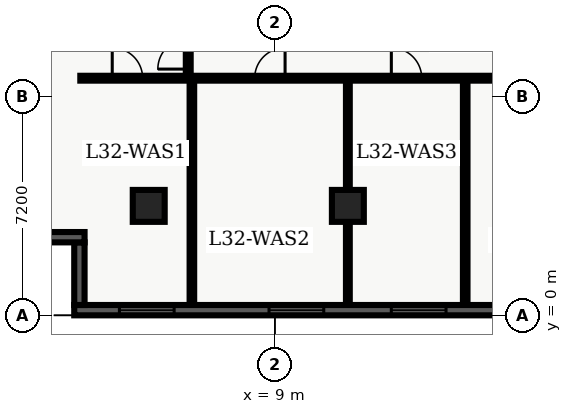
"""IFC4 building model, lengths in metres.
Left out: names, types, materials, properties, quantities, classifications, styles, units other than length and angle.
Written with IfcOpenShell. Run it as: python <this file> out.ifc"""

import sys

from ifc_helpers import new_model, entity, si_unit, converted_unit, direction, frame, origin_with_axes, origin_2d_with_axis, place, context, subcontext, project, spatial, polyline, rectangle, outline, extrude, element, fill, save


model = new_model("IFC4")
c1 = context("Model", 3, precision=1e-05, world=origin_with_axes(), true_north=direction((0.0, 1.0)))
c2 = subcontext(c1, "Body", "Model", "MODEL_VIEW")
j1 = project(units=[si_unit("LENGTHUNIT", "METRE"), converted_unit("PLANEANGLEUNIT", "DEGREE", entity("IfcPlaneAngleMeasure", 0.017), si_unit("PLANEANGLEUNIT", "RADIAN"), dimensions=[0, 0, 0, 0, 0, 0, 0])], contexts=[c1])
p1 = place(None, origin_with_axes())
s1 = spatial("IfcSite", under=j1, at=p1, CompositionType="ELEMENT")
p2 = place(p1, origin_with_axes())
s2 = spatial("IfcBuilding", under=s1, at=p2, CompositionType="ELEMENT")
p3 = place(p2, frame((0.0, 0.0, 132.9), z_axis=(0.0, 0.0, 1.0), x_axis=(1.0, 0.0, 0.0)))
s3 = spatial("IfcBuildingStorey", under=s2, at=p3, CompositionType="ELEMENT", Elevation=132.9)
for number, where, z_axis, x_axis in (
    (1, (11.4, 3.6, 0.0), (0.0, 0.0, 1.0), (1.0, 0.0, 0.0)),
    (2, (4.85, 3.6, 0.0), (0.0, 0.0, 1.0), (1.0, 0.0, 0.0)),
):
    element("IfcColumn", number, at=place(p3, frame(where, z_axis=z_axis, x_axis=x_axis)), inside=s3, PredefinedType="COLUMN", context=c2, shape_type="SweptSolid", body=[
        extrude(rectangle(XDim=1.05, YDim=1.05, at=origin_2d_with_axis()), origin_with_axes(), (0.0, 0.0, 1.0), 3.9),
    ])
p4 = place(p3, frame((2.6, 7.8, 0.0), z_axis=(0.0, 0.0, 1.0), x_axis=(1.0, 0.0, 0.0)))
e3 = element("IfcWall", 3, at=p4, inside=s3, PredefinedType="PARTITIONING", context=c2, shape_type="SweptSolid", body=[
    extrude(outline(polyline([(0.0, -0.08), (18.55, -0.08), (18.55, 0.08), (0.0, 0.08), (0.0, -0.08)])), origin_with_axes(), (0.0, 0.0, 1.0), 2.7),
])
p5 = place(p4, frame((1.55, 0.0, 0.0), z_axis=(0.0, 0.0, 1.0), x_axis=(1.0, 0.0, 0.0)))
e4 = element("IfcOpeningElement", 4, at=p5, cuts=e3, PredefinedType="OPENING", context=c2, shape_type="SweptSolid", body=[
    extrude(rectangle(XDim=1.0, YDim=0.18, at=origin_2d_with_axis()), origin_with_axes(), (0.0, 0.0, 1.0), 2.15),
])
p6 = place(p4, frame((6.235, 0.0, 0.0), z_axis=(0.0, 0.0, 1.0), x_axis=(1.0, 0.0, 0.0)))
e5 = element("IfcOpeningElement", 5, at=p6, cuts=e3, PredefinedType="OPENING", context=c2, shape_type="SweptSolid", body=[
    extrude(rectangle(XDim=1.0, YDim=0.18, at=origin_2d_with_axis()), origin_with_axes(), (0.0, 0.0, 1.0), 2.15),
])
p7 = place(p4, frame((10.73, 0.0, 0.0), z_axis=(0.0, 0.0, 1.0), x_axis=(1.0, 0.0, 0.0)))
e6 = element("IfcOpeningElement", 6, at=p7, cuts=e3, PredefinedType="OPENING", context=c2, shape_type="SweptSolid", body=[
    extrude(rectangle(XDim=1.0, YDim=0.18, at=origin_2d_with_axis()), origin_with_axes(), (0.0, 0.0, 1.0), 2.15),
])
p8 = place(p4, frame((15.58, 0.0, 0.0), z_axis=(0.0, 0.0, 1.0), x_axis=(1.0, 0.0, 0.0)))
e7 = element("IfcOpeningElement", 7, at=p8, cuts=e3, PredefinedType="OPENING", context=c2, shape_type="SweptSolid", body=[
    extrude(rectangle(XDim=1.0, YDim=0.18, at=origin_2d_with_axis()), origin_with_axes(), (0.0, 0.0, 1.0), 2.15),
])
p9 = place(p3, frame((6.15, 7.8, 0.0), z_axis=(0.0, 0.0, 1.0), x_axis=(0.0, 1.0, 0.0)))
e8 = element("IfcWall", 8, at=p9, inside=s3, PredefinedType="PARTITIONING", context=c2, shape_type="SweptSolid", body=[
    extrude(outline(polyline([(0.0, -0.08), (32.7, -0.08), (32.7, 0.08), (0.0, 0.08), (0.0, -0.08)])), origin_with_axes(), (0.0, 0.0, 1.0), 2.7),
])
p10 = place(p9, frame((0.8, 0.0, 0.0), z_axis=(0.0, 0.0, 1.0), x_axis=(1.0, 0.0, 0.0)))
e9 = element("IfcOpeningElement", 9, at=p10, cuts=e8, PredefinedType="OPENING", context=c2, shape_type="SweptSolid", body=[
    extrude(rectangle(XDim=1.0, YDim=0.18, at=origin_2d_with_axis()), origin_with_axes(), (0.0, 0.0, 1.0), 2.15),
])
p11 = place(p9, frame((5.704, 0.0, 0.0), z_axis=(0.0, 0.0, 1.0), x_axis=(1.0, 0.0, 0.0)))
e10 = element("IfcOpeningElement", 10, at=p11, cuts=e8, PredefinedType="OPENING", context=c2, shape_type="SweptSolid", body=[
    extrude(rectangle(XDim=1.0, YDim=0.18, at=origin_2d_with_axis()), origin_with_axes(), (0.0, 0.0, 1.0), 2.15),
])
p12 = place(p9, frame((10.025, 0.0, 0.0), z_axis=(0.0, 0.0, 1.0), x_axis=(1.0, 0.0, 0.0)))
e11 = element("IfcOpeningElement", 11, at=p12, cuts=e8, PredefinedType="OPENING", context=c2, shape_type="SweptSolid", body=[
    extrude(rectangle(XDim=1.0, YDim=0.18, at=origin_2d_with_axis()), origin_with_axes(), (0.0, 0.0, 1.0), 2.15),
])
p13 = place(p9, frame((14.217, 0.0, 0.0), z_axis=(0.0, 0.0, 1.0), x_axis=(1.0, 0.0, 0.0)))
e12 = element("IfcOpeningElement", 12, at=p13, cuts=e8, PredefinedType="OPENING", context=c2, shape_type="SweptSolid", body=[
    extrude(rectangle(XDim=1.0, YDim=0.18, at=origin_2d_with_axis()), origin_with_axes(), (0.0, 0.0, 1.0), 2.15),
])
p14 = place(p9, frame((21.212, 0.0, 0.0), z_axis=(0.0, 0.0, 1.0), x_axis=(1.0, 0.0, 0.0)))
e13 = element("IfcOpeningElement", 13, at=p14, cuts=e8, PredefinedType="OPENING", context=c2, shape_type="SweptSolid", body=[
    extrude(rectangle(XDim=1.0, YDim=0.18, at=origin_2d_with_axis()), origin_with_axes(), (0.0, 0.0, 1.0), 2.15),
])
p15 = place(p9, frame((27.694, 0.0, 0.0), z_axis=(0.0, 0.0, 1.0), x_axis=(1.0, 0.0, 0.0)))
e14 = element("IfcOpeningElement", 14, at=p15, cuts=e8, PredefinedType="OPENING", context=c2, shape_type="SweptSolid", body=[
    extrude(rectangle(XDim=1.0, YDim=0.18, at=origin_2d_with_axis()), origin_with_axes(), (0.0, 0.0, 1.0), 2.15),
])
p16 = place(p3, frame((6.27, 0.335, 0.0), z_axis=(0.0, 0.0, 1.0), x_axis=(0.0, 1.0, 0.0)))
e15 = element("IfcWall", 15, at=p16, inside=s3, PredefinedType="PARTITIONING", context=c2, shape_type="SweptSolid", body=[
    extrude(outline(polyline([(0.0, -0.075), (7.365, -0.075), (7.365, 0.075), (0.0, 0.075), (0.0, -0.075)])), origin_with_axes(), (0.0, 0.0, 1.0), 2.7),
])
p17 = place(p3, frame((11.4, 0.335, 0.0), z_axis=(0.0, 0.0, 1.0), x_axis=(0.0, 1.0, 0.0)))
e16 = element("IfcWall", 16, at=p17, inside=s3, PredefinedType="PARTITIONING", context=c2, shape_type="SweptSolid", body=[
    extrude(outline(polyline([(0.0, -0.062), (7.365, -0.062), (7.365, 0.062), (0.0, 0.062), (0.0, -0.062)])), origin_with_axes(), (0.0, 0.0, 1.0), 2.7),
])
p18 = place(p3, frame((15.26, 0.335, 0.0), z_axis=(0.0, 0.0, 1.0), x_axis=(0.0, 1.0, 0.0)))
e17 = element("IfcWall", 17, at=p18, inside=s3, PredefinedType="PARTITIONING", context=c2, shape_type="SweptSolid", body=[
    extrude(outline(polyline([(0.0, -0.075), (7.365, -0.075), (7.365, 0.075), (0.0, 0.075), (0.0, -0.075)])), origin_with_axes(), (0.0, 0.0, 1.0), 2.7),
])
p19 = place(p3, frame((57.26, 0.17, 0.0), z_axis=(0.0, 0.0, 1.0), x_axis=(-1.0, 0.0, 0.0)))
e18 = element("IfcWall", 18, at=p19, inside=s3, PredefinedType="SOLIDWALL", context=c2, shape_type="SweptSolid", body=[
    extrude(outline(polyline([(0.0, -0.17), (54.86, -0.17), (54.86, 0.17), (0.0, 0.17), (0.0, -0.17)])), origin_with_axes(), (0.0, 0.0, 1.0), 3.66),
])
p20 = place(p19, frame((2.836, 0.0, 0.45), z_axis=(0.0, 0.0, 1.0), x_axis=(1.0, 0.0, 0.0)))
e19 = element("IfcOpeningElement", 19, at=p20, cuts=e18, PredefinedType="OPENING", context=c2, shape_type="SweptSolid", body=[
    extrude(rectangle(XDim=1.8, YDim=0.36, at=origin_2d_with_axis()), origin_with_axes(), (0.0, 0.0, 1.0), 2.1),
])
p21 = place(p19, frame((7.307, 0.0, 0.45), z_axis=(0.0, 0.0, 1.0), x_axis=(1.0, 0.0, 0.0)))
e20 = element("IfcOpeningElement", 20, at=p21, cuts=e18, PredefinedType="OPENING", context=c2, shape_type="SweptSolid", body=[
    extrude(rectangle(XDim=1.8, YDim=0.36, at=origin_2d_with_axis()), origin_with_axes(), (0.0, 0.0, 1.0), 2.1),
])
p22 = place(p19, frame((11.779, 0.0, 0.45), z_axis=(0.0, 0.0, 1.0), x_axis=(1.0, 0.0, 0.0)))
e21 = element("IfcOpeningElement", 21, at=p22, cuts=e18, PredefinedType="OPENING", context=c2, shape_type="SweptSolid", body=[
    extrude(rectangle(XDim=1.8, YDim=0.36, at=origin_2d_with_axis()), origin_with_axes(), (0.0, 0.0, 1.0), 2.1),
])
p23 = place(p19, frame((16.251, 0.0, 0.45), z_axis=(0.0, 0.0, 1.0), x_axis=(1.0, 0.0, 0.0)))
e22 = element("IfcOpeningElement", 22, at=p23, cuts=e18, PredefinedType="OPENING", context=c2, shape_type="SweptSolid", body=[
    extrude(rectangle(XDim=1.8, YDim=0.36, at=origin_2d_with_axis()), origin_with_axes(), (0.0, 0.0, 1.0), 2.1),
])
p24 = place(p19, frame((20.723, 0.0, 0.45), z_axis=(0.0, 0.0, 1.0), x_axis=(1.0, 0.0, 0.0)))
e23 = element("IfcOpeningElement", 23, at=p24, cuts=e18, PredefinedType="OPENING", context=c2, shape_type="SweptSolid", body=[
    extrude(rectangle(XDim=1.8, YDim=0.36, at=origin_2d_with_axis()), origin_with_axes(), (0.0, 0.0, 1.0), 2.1),
])
p25 = place(p19, frame((30.516, 0.0, 0.45), z_axis=(0.0, 0.0, 1.0), x_axis=(1.0, 0.0, 0.0)))
e24 = element("IfcOpeningElement", 24, at=p25, cuts=e18, PredefinedType="OPENING", context=c2, shape_type="SweptSolid", body=[
    extrude(rectangle(XDim=1.8, YDim=0.36, at=origin_2d_with_axis()), origin_with_axes(), (0.0, 0.0, 1.0), 2.1),
])
p26 = place(p19, frame((34.138, 0.0, 0.45), z_axis=(0.0, 0.0, 1.0), x_axis=(1.0, 0.0, 0.0)))
e25 = element("IfcOpeningElement", 25, at=p26, cuts=e18, PredefinedType="OPENING", context=c2, shape_type="SweptSolid", body=[
    extrude(rectangle(XDim=1.8, YDim=0.36, at=origin_2d_with_axis()), origin_with_axes(), (0.0, 0.0, 1.0), 2.1),
])
p27 = place(p19, frame((38.609, 0.0, 0.45), z_axis=(0.0, 0.0, 1.0), x_axis=(1.0, 0.0, 0.0)))
e26 = element("IfcOpeningElement", 26, at=p27, cuts=e18, PredefinedType="OPENING", context=c2, shape_type="SweptSolid", body=[
    extrude(rectangle(XDim=1.8, YDim=0.36, at=origin_2d_with_axis()), origin_with_axes(), (0.0, 0.0, 1.0), 2.1),
])
p28 = place(p19, frame((43.531, 0.0, 0.45), z_axis=(0.0, 0.0, 1.0), x_axis=(1.0, 0.0, 0.0)))
e27 = element("IfcOpeningElement", 27, at=p28, cuts=e18, PredefinedType="OPENING", context=c2, shape_type="SweptSolid", body=[
    extrude(rectangle(XDim=1.8, YDim=0.36, at=origin_2d_with_axis()), origin_with_axes(), (0.0, 0.0, 1.0), 2.1),
])
p29 = place(p19, frame((47.553, 0.0, 0.45), z_axis=(0.0, 0.0, 1.0), x_axis=(1.0, 0.0, 0.0)))
e28 = element("IfcOpeningElement", 28, at=p29, cuts=e18, PredefinedType="OPENING", context=c2, shape_type="SweptSolid", body=[
    extrude(rectangle(XDim=1.8, YDim=0.36, at=origin_2d_with_axis()), origin_with_axes(), (0.0, 0.0, 1.0), 2.1),
])
p30 = place(p19, frame((52.474, 0.0, 0.45), z_axis=(0.0, 0.0, 1.0), x_axis=(1.0, 0.0, 0.0)))
e29 = element("IfcOpeningElement", 29, at=p30, cuts=e18, PredefinedType="OPENING", context=c2, shape_type="SweptSolid", body=[
    extrude(rectangle(XDim=1.8, YDim=0.36, at=origin_2d_with_axis()), origin_with_axes(), (0.0, 0.0, 1.0), 2.1),
])
p31 = place(p3, frame((2.57, 0.34, 0.0), z_axis=(0.0, 0.0, 1.0), x_axis=(0.0, 1.0, 0.0)))
e30 = element("IfcWall", 30, at=p31, inside=s3, PredefinedType="SOLIDWALL", context=c2, shape_type="SweptSolid", body=[
    extrude(outline(polyline([(0.0, -0.17), (2.06, -0.17), (2.06, 0.17), (0.0, 0.17), (0.0, -0.17)])), origin_with_axes(), (0.0, 0.0, 1.0), 3.66),
])
p32 = place(p3, frame((2.74, 2.57, 0.0), z_axis=(0.0, 0.0, 1.0), x_axis=(-1.0, 0.0, 0.0)))
e31 = element("IfcWall", 31, at=p32, inside=s3, PredefinedType="SOLIDWALL", context=c2, shape_type="SweptSolid", body=[
    extrude(outline(polyline([(0.0, -0.17), (2.74, -0.17), (2.74, 0.17), (0.0, 0.17), (0.0, -0.17)])), origin_with_axes(), (0.0, 0.0, 1.0), 3.66),
])
p33 = place(p9, frame((0.8, 0.0, 0.0), z_axis=(0.0, 0.0, 1.0), x_axis=(1.0, 0.0, 0.0)))
e32 = element("IfcDoor", 32, at=p33, inside=s3, OperationType="SINGLE_SWING_LEFT", PredefinedType="DOOR", context=c2, shape_type="SweptSolid", body=[
    extrude(rectangle(XDim=1.0, YDim=0.09, at=origin_2d_with_axis()), origin_with_axes(), (0.0, 0.0, 1.0), 2.15),
])
fill(e9, e32)
p34 = place(p4, frame((1.55, 0.0, 0.0), z_axis=(0.0, 0.0, 1.0), x_axis=(1.0, 0.0, 0.0)))
e33 = element("IfcDoor", 33, at=p34, inside=s3, OperationType="SINGLE_SWING_LEFT", PredefinedType="DOOR", context=c2, shape_type="SweptSolid", body=[
    extrude(rectangle(XDim=1.0, YDim=0.09, at=origin_2d_with_axis()), origin_with_axes(), (0.0, 0.0, 1.0), 2.15),
])
fill(e4, e33)
p35 = place(p4, frame((6.235, 0.0, 0.0), z_axis=(0.0, 0.0, 1.0), x_axis=(1.0, 0.0, 0.0)))
e34 = element("IfcDoor", 34, at=p35, inside=s3, OperationType="SINGLE_SWING_RIGHT", PredefinedType="DOOR", context=c2, shape_type="SweptSolid", body=[
    extrude(rectangle(XDim=1.0, YDim=0.09, at=origin_2d_with_axis()), origin_with_axes(), (0.0, 0.0, 1.0), 2.15),
])
fill(e5, e34)
p36 = place(p4, frame((10.73, 0.0, 0.0), z_axis=(0.0, 0.0, 1.0), x_axis=(1.0, 0.0, 0.0)))
e35 = element("IfcDoor", 35, at=p36, inside=s3, OperationType="SINGLE_SWING_LEFT", PredefinedType="DOOR", context=c2, shape_type="SweptSolid", body=[
    extrude(rectangle(XDim=1.0, YDim=0.09, at=origin_2d_with_axis()), origin_with_axes(), (0.0, 0.0, 1.0), 2.15),
])
fill(e6, e35)
p37 = place(p19, frame((43.531, 0.0, 0.45), z_axis=(0.0, 0.0, 1.0), x_axis=(1.0, 0.0, 0.0)))
e36 = element("IfcWindow", 36, at=p37, inside=s3, PredefinedType="WINDOW", context=c2, shape_type="SweptSolid", body=[
    extrude(rectangle(XDim=1.8, YDim=0.09, at=origin_2d_with_axis()), origin_with_axes(), (0.0, 0.0, 1.0), 2.1),
])
fill(e27, e36)
p38 = place(p19, frame((47.553, 0.0, 0.45), z_axis=(0.0, 0.0, 1.0), x_axis=(1.0, 0.0, 0.0)))
e37 = element("IfcWindow", 37, at=p38, inside=s3, PredefinedType="WINDOW", context=c2, shape_type="SweptSolid", body=[
    extrude(rectangle(XDim=1.8, YDim=0.09, at=origin_2d_with_axis()), origin_with_axes(), (0.0, 0.0, 1.0), 2.1),
])
fill(e28, e37)
p39 = place(p19, frame((52.474, 0.0, 0.45), z_axis=(0.0, 0.0, 1.0), x_axis=(1.0, 0.0, 0.0)))
e38 = element("IfcWindow", 38, at=p39, inside=s3, PredefinedType="WINDOW", context=c2, shape_type="SweptSolid", body=[
    extrude(rectangle(XDim=1.8, YDim=0.09, at=origin_2d_with_axis()), origin_with_axes(), (0.0, 0.0, 1.0), 2.1),
])
fill(e29, e38)
save(model, sys.argv[1])
